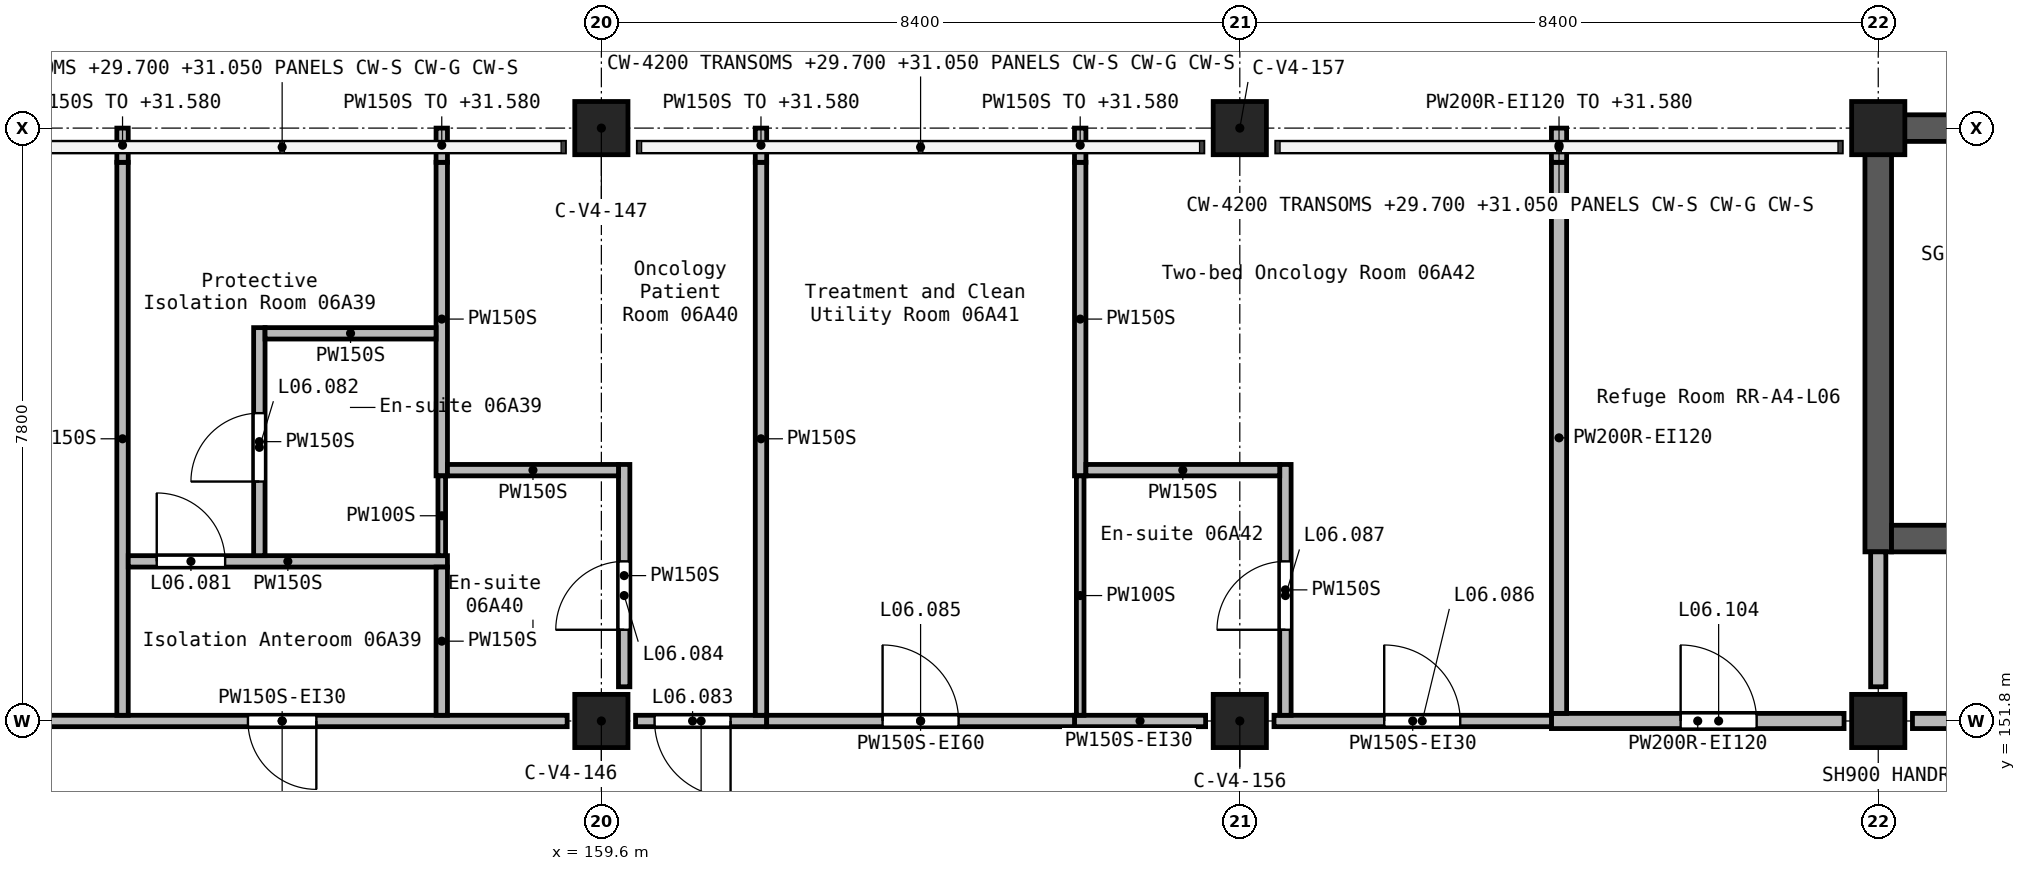
"""IFC4 building model, lengths in metres.
Left out: names, types, materials, properties, quantities, classifications, styles, units other than length and angle.
Written with IfcOpenShell. Run it as: python <this file> out.ifc"""

import sys

from ifc_helpers import new_model, si_unit, direction, frame, frame_2d, origin, origin_2d, place, context, subcontext, project, spatial, rectangle, extrude, element, fill, save


model = new_model("IFC4")
c1 = context("Model", 3, precision=1e-05, world=origin(), true_north=direction((0.0, 1.0)))
c2 = subcontext(c1, "Body", "Model", "MODEL_VIEW")
j1 = project(units=[si_unit("LENGTHUNIT", "METRE"), si_unit("PLANEANGLEUNIT", "RADIAN")], contexts=[c1])
p1 = place(None, origin())
s1 = spatial("IfcSite", under=j1, at=p1, CompositionType="ELEMENT")
p2 = place(p1, origin())
s2 = spatial("IfcBuilding", under=s1, at=p2, CompositionType="ELEMENT")
p3 = place(p2, frame((0.0, 0.0, 28.8)))
s3 = spatial("IfcBuildingStorey", under=s2, at=p3, CompositionType="ELEMENT", Elevation=28.8)
for number, where, z_axis, x_axis in (
    (1, (159.6, 151.8, 0.0), (0.0, 0.0, 1.0), (1.0, 0.0, 0.0)),
    (2, (159.6, 159.6, 0.0), (0.0, 0.0, 1.0), (1.0, 0.0, 0.0)),
    (3, (168.0, 151.8, 0.0), (0.0, 0.0, 1.0), (1.0, 0.0, 0.0)),
    (4, (168.0, 159.6, 0.0), (0.0, 0.0, 1.0), (1.0, 0.0, 0.0)),
    (5, (176.4, 151.8, 0.0), (0.0, 0.0, 1.0), (1.0, 0.0, 0.0)),
    (6, (176.4, 159.6, 0.0), (0.0, 0.0, 1.0), (1.0, 0.0, 0.0)),
):
    element("IfcColumn", number, at=place(p3, frame(where, z_axis=z_axis, x_axis=x_axis)), inside=s3, PredefinedType="COLUMN", context=c2, shape_type="SweptSolid", body=[
        extrude(rectangle(XDim=0.7, YDim=0.7, at=origin_2d()), origin(), (0.0, 0.0, 1.0), 3.9),
    ])
p4 = place(p3, frame((176.225, 159.6, 0.0), z_axis=(0.0, 0.0, 1.0), x_axis=(1.0, 0.0, 0.0)))
e7 = element("IfcWall", 7, at=p4, inside=s3, PredefinedType="SHEAR", context=c2, shape_type="SweptSolid", body=[
    extrude(rectangle(XDim=8.4, YDim=0.35, at=frame_2d((4.2, 0.0))), origin(), (0.0, 0.0, 1.0), 3.9),
])
p5 = place(p3, frame((176.4, 154.025, 0.0), z_axis=(0.0, 0.0, 1.0), x_axis=(0.0, 1.0, 0.0)))
e8 = element("IfcWall", 8, at=p5, inside=s3, PredefinedType="SHEAR", context=c2, shape_type="SweptSolid", body=[
    extrude(rectangle(XDim=5.4, YDim=0.35, at=frame_2d((2.7, 0.0))), origin(), (0.0, 0.0, 1.0), 3.9),
])
p6 = place(p3, frame((176.575, 154.2, 0.0), z_axis=(0.0, 0.0, 1.0), x_axis=(1.0, 0.0, 0.0)))
e9 = element("IfcWall", 9, at=p6, inside=s3, PredefinedType="SHEAR", context=c2, shape_type="SweptSolid", body=[
    extrude(rectangle(XDim=8.05, YDim=0.35, at=frame_2d((4.025, 0.0))), origin(), (0.0, 0.0, 1.0), 3.9),
])
p7 = place(p6, frame((6.525, 0.0, 0.0)))
e10 = element("IfcOpeningElement", 10, at=p7, cuts=e9, PredefinedType="OPENING", context=c2, shape_type="SweptSolid", body=[
    extrude(rectangle(XDim=1.1, YDim=2.1, at=frame_2d((0.55, 1.05))), frame((0.0, 0.185, 0.0), z_axis=(0.0, -1.0, 0.0), x_axis=(1.0, 0.0, 0.0)), (0.0, 0.0, 1.0), 0.37),
])
p8 = place(p3, frame((172.1, 151.8, 0.0), z_axis=(0.0, 0.0, 1.0), x_axis=(1.0, 0.0, 0.0)))
e11 = element("IfcWall", 11, at=p8, inside=s3, PredefinedType="SOLIDWALL", context=c2, shape_type="SweptSolid", body=[
    extrude(rectangle(XDim=3.85, YDim=0.2, at=frame_2d((1.925, 0.0))), origin(), (0.0, 0.0, 1.0), 3.6),
])
p9 = place(p8, frame((1.7, 0.0, 0.0)))
e12 = element("IfcOpeningElement", 12, at=p9, cuts=e11, PredefinedType="OPENING", context=c2, shape_type="SweptSolid", body=[
    extrude(rectangle(XDim=1.0, YDim=2.1, at=frame_2d((0.5, 1.05))), frame((0.0, 0.11, 0.0), z_axis=(0.0, -1.0, 0.0), x_axis=(1.0, 0.0, 0.0)), (0.0, 0.0, 1.0), 0.22),
])
p10 = place(p3, frame((176.85, 151.8, 0.0), z_axis=(0.0, 0.0, 1.0), x_axis=(1.0, 0.0, 0.0)))
e13 = element("IfcWall", 13, at=p10, inside=s3, PredefinedType="SOLIDWALL", context=c2, shape_type="SweptSolid", body=[
    extrude(rectangle(XDim=7.5, YDim=0.2, at=frame_2d((3.75, 0.0))), origin(), (0.0, 0.0, 1.0), 3.6),
])
p11 = place(p10, frame((3.2, 0.0, 0.0)))
e14 = element("IfcOpeningElement", 14, at=p11, cuts=e13, PredefinedType="OPENING", context=c2, shape_type="SweptSolid", body=[
    extrude(rectangle(XDim=1.1, YDim=2.1, at=frame_2d((0.55, 1.05))), frame((0.0, 0.11, 0.0), z_axis=(0.0, -1.0, 0.0), x_axis=(1.0, 0.0, 0.0)), (0.0, 0.0, 1.0), 0.22),
])
p12 = place(p3, frame((176.4, 152.25, 0.0), z_axis=(0.0, 0.0, 1.0), x_axis=(0.0, 1.0, 0.0)))
e15 = element("IfcWall", 15, at=p12, inside=s3, PredefinedType="SOLIDWALL", context=c2, shape_type="SweptSolid", body=[
    extrude(rectangle(XDim=1.775, YDim=0.2, at=frame_2d((0.887, 0.0))), origin(), (0.0, 0.0, 1.0), 3.6),
])
p13 = place(p3, frame((172.2, 151.9, 0.0), z_axis=(0.0, 0.0, 1.0), x_axis=(0.0, 1.0, 0.0)))
e16 = element("IfcWall", 16, at=p13, inside=s3, PredefinedType="SOLIDWALL", context=c2, shape_type="SweptSolid", body=[
    extrude(rectangle(XDim=7.25, YDim=0.2, at=frame_2d((3.625, 0.0))), origin(), (0.0, 0.0, 1.0), 3.6),
])
p14 = place(p3, frame((172.2, 159.15, 0.0), z_axis=(0.0, 0.0, 1.0), x_axis=(0.0, 1.0, 0.0)))
e17 = element("IfcWall", 17, at=p14, inside=s3, PredefinedType="SOLIDWALL", context=c2, shape_type="SweptSolid", body=[
    extrude(rectangle(XDim=0.45, YDim=0.2, at=frame_2d((0.225, 0.0))), origin(), (0.0, 0.0, 1.0), 2.78),
])
p15 = place(p3, frame((161.775, 151.8, 0.0), z_axis=(0.0, 0.0, 1.0), x_axis=(-1.0, 0.0, 0.0)))
e18 = element("IfcWall", 18, at=p15, inside=s3, PredefinedType="PARTITIONING", context=c2, shape_type="SweptSolid", body=[
    extrude(rectangle(XDim=1.725, YDim=0.15, at=frame_2d((0.862, 0.0))), origin(), (0.0, 0.0, 1.0), 3.6),
])
p16 = place(p15, frame((0.475, 0.0, 0.0)))
e19 = element("IfcOpeningElement", 19, at=p16, cuts=e18, PredefinedType="OPENING", context=c2, shape_type="SweptSolid", body=[
    extrude(rectangle(XDim=1.0, YDim=2.1, at=frame_2d((0.5, 1.05))), frame((0.0, 0.085, 0.0), z_axis=(0.0, -1.0, 0.0), x_axis=(1.0, 0.0, 0.0)), (0.0, 0.0, 1.0), 0.17),
])
p17 = place(p3, frame((159.15, 151.8, 0.0), z_axis=(0.0, 0.0, 1.0), x_axis=(-1.0, 0.0, 0.0)))
e20 = element("IfcWall", 20, at=p17, inside=s3, PredefinedType="PARTITIONING", context=c2, shape_type="SweptSolid", body=[
    extrude(rectangle(XDim=7.5, YDim=0.15, at=frame_2d((3.75, 0.0))), origin(), (0.0, 0.0, 1.0), 3.6),
])
p18 = place(p17, frame((3.3, 0.0, 0.0)))
e21 = element("IfcOpeningElement", 21, at=p18, cuts=e20, PredefinedType="OPENING", context=c2, shape_type="SweptSolid", body=[
    extrude(rectangle(XDim=0.9, YDim=2.1, at=frame_2d((0.45, 1.05))), frame((0.0, 0.085, 0.0), z_axis=(0.0, -1.0, 0.0), x_axis=(1.0, 0.0, 0.0)), (0.0, 0.0, 1.0), 0.17),
])
p19 = place(p3, frame((165.825, 151.8, 0.0), z_axis=(0.0, 0.0, 1.0), x_axis=(1.0, 0.0, 0.0)))
e22 = element("IfcWall", 22, at=p19, inside=s3, PredefinedType="PARTITIONING", context=c2, shape_type="SweptSolid", body=[
    extrude(rectangle(XDim=1.725, YDim=0.15, at=frame_2d((0.863, 0.0))), origin(), (0.0, 0.0, 1.0), 3.6),
])
p20 = place(p3, frame((168.45, 151.8, 0.0), z_axis=(0.0, 0.0, 1.0), x_axis=(1.0, 0.0, 0.0)))
e23 = element("IfcWall", 23, at=p20, inside=s3, PredefinedType="PARTITIONING", context=c2, shape_type="SweptSolid", body=[
    extrude(rectangle(XDim=3.65, YDim=0.15, at=frame_2d((1.825, 0.0))), origin(), (0.0, 0.0, 1.0), 3.6),
])
p21 = place(p20, frame((1.45, 0.0, 0.0)))
e24 = element("IfcOpeningElement", 24, at=p21, cuts=e23, PredefinedType="OPENING", context=c2, shape_type="SweptSolid", body=[
    extrude(rectangle(XDim=1.0, YDim=2.1, at=frame_2d((0.5, 1.05))), frame((0.0, 0.085, 0.0), z_axis=(0.0, -1.0, 0.0), x_axis=(1.0, 0.0, 0.0)), (0.0, 0.0, 1.0), 0.17),
])
p22 = place(p3, frame((161.775, 151.8, 0.0), z_axis=(0.0, 0.0, 1.0), x_axis=(1.0, 0.0, 0.0)))
e25 = element("IfcWall", 25, at=p22, inside=s3, PredefinedType="PARTITIONING", context=c2, shape_type="SweptSolid", body=[
    extrude(rectangle(XDim=4.05, YDim=0.15, at=frame_2d((2.025, 0.0))), origin(), (0.0, 0.0, 1.0), 3.6),
])
p23 = place(p22, frame((1.525, 0.0, 0.0)))
e26 = element("IfcOpeningElement", 26, at=p23, cuts=e25, PredefinedType="OPENING", context=c2, shape_type="SweptSolid", body=[
    extrude(rectangle(XDim=1.0, YDim=2.1, at=frame_2d((0.5, 1.05))), frame((0.0, 0.085, 0.0), z_axis=(0.0, -1.0, 0.0), x_axis=(1.0, 0.0, 0.0)), (0.0, 0.0, 1.0), 0.17),
])
p24 = place(p3, frame((153.3, 151.875, 0.0), z_axis=(0.0, 0.0, 1.0), x_axis=(0.0, 1.0, 0.0)))
e27 = element("IfcWall", 27, at=p24, inside=s3, PredefinedType="PARTITIONING", context=c2, shape_type="SweptSolid", body=[
    extrude(rectangle(XDim=7.275, YDim=0.15, at=frame_2d((3.637, 0.0))), origin(), (0.0, 0.0, 1.0), 3.6),
])
p25 = place(p3, frame((153.3, 159.15, 0.0), z_axis=(0.0, 0.0, 1.0), x_axis=(0.0, 1.0, 0.0)))
e28 = element("IfcWall", 28, at=p25, inside=s3, PredefinedType="PARTITIONING", context=c2, shape_type="SweptSolid", body=[
    extrude(rectangle(XDim=0.45, YDim=0.15, at=frame_2d((0.225, 0.0))), origin(), (0.0, 0.0, 1.0), 2.78),
])
p26 = place(p3, frame((161.7, 151.875, 0.0), z_axis=(0.0, 0.0, 1.0), x_axis=(0.0, 1.0, 0.0)))
e29 = element("IfcWall", 29, at=p26, inside=s3, PredefinedType="PARTITIONING", context=c2, shape_type="SweptSolid", body=[
    extrude(rectangle(XDim=7.275, YDim=0.15, at=frame_2d((3.637, 0.0))), origin(), (0.0, 0.0, 1.0), 3.6),
])
p27 = place(p3, frame((161.7, 159.15, 0.0), z_axis=(0.0, 0.0, 1.0), x_axis=(0.0, 1.0, 0.0)))
e30 = element("IfcWall", 30, at=p27, inside=s3, PredefinedType="PARTITIONING", context=c2, shape_type="SweptSolid", body=[
    extrude(rectangle(XDim=0.45, YDim=0.15, at=frame_2d((0.225, 0.0))), origin(), (0.0, 0.0, 1.0), 2.78),
])
p28 = place(p3, frame((157.5, 155.025, 0.0), z_axis=(0.0, 0.0, 1.0), x_axis=(0.0, 1.0, 0.0)))
e31 = element("IfcWall", 31, at=p28, inside=s3, PredefinedType="PARTITIONING", context=c2, shape_type="SweptSolid", body=[
    extrude(rectangle(XDim=4.125, YDim=0.15, at=frame_2d((2.062, 0.0))), origin(), (0.0, 0.0, 1.0), 3.6),
])
p29 = place(p3, frame((157.5, 159.15, 0.0), z_axis=(0.0, 0.0, 1.0), x_axis=(0.0, 1.0, 0.0)))
e32 = element("IfcWall", 32, at=p29, inside=s3, PredefinedType="PARTITIONING", context=c2, shape_type="SweptSolid", body=[
    extrude(rectangle(XDim=0.45, YDim=0.15, at=frame_2d((0.225, 0.0))), origin(), (0.0, 0.0, 1.0), 2.78),
])
p30 = place(p3, frame((165.9, 155.025, 0.0), z_axis=(0.0, 0.0, 1.0), x_axis=(0.0, 1.0, 0.0)))
e33 = element("IfcWall", 33, at=p30, inside=s3, PredefinedType="PARTITIONING", context=c2, shape_type="SweptSolid", body=[
    extrude(rectangle(XDim=4.125, YDim=0.15, at=frame_2d((2.062, 0.0))), origin(), (0.0, 0.0, 1.0), 3.6),
])
p31 = place(p3, frame((165.9, 159.15, 0.0), z_axis=(0.0, 0.0, 1.0), x_axis=(0.0, 1.0, 0.0)))
e34 = element("IfcWall", 34, at=p31, inside=s3, PredefinedType="PARTITIONING", context=c2, shape_type="SweptSolid", body=[
    extrude(rectangle(XDim=0.45, YDim=0.15, at=frame_2d((0.225, 0.0))), origin(), (0.0, 0.0, 1.0), 2.78),
])
p32 = place(p3, frame((153.375, 153.9, 0.0), z_axis=(0.0, 0.0, 1.0), x_axis=(1.0, 0.0, 0.0)))
e35 = element("IfcWall", 35, at=p32, inside=s3, PredefinedType="PARTITIONING", context=c2, shape_type="SweptSolid", body=[
    extrude(rectangle(XDim=4.2, YDim=0.15, at=frame_2d((2.1, 0.0))), origin(), (0.0, 0.0, 1.0), 3.6),
])
p33 = place(p32, frame((0.375, 0.0, 0.0)))
e36 = element("IfcOpeningElement", 36, at=p33, cuts=e35, PredefinedType="OPENING", context=c2, shape_type="SweptSolid", body=[
    extrude(rectangle(XDim=0.9, YDim=2.1, at=frame_2d((0.45, 1.05))), frame((0.0, 0.085, 0.0), z_axis=(0.0, -1.0, 0.0), x_axis=(1.0, 0.0, 0.0)), (0.0, 0.0, 1.0), 0.17),
])
p34 = place(p3, frame((159.9, 152.25, 0.0), z_axis=(0.0, 0.0, 1.0), x_axis=(0.0, 1.0, 0.0)))
e37 = element("IfcWall", 37, at=p34, inside=s3, PredefinedType="PARTITIONING", context=c2, shape_type="SweptSolid", body=[
    extrude(rectangle(XDim=2.925, YDim=0.15, at=frame_2d((1.462, 0.0))), origin(), (0.0, 0.0, 1.0), 3.6),
])
p35 = place(p34, frame((0.75, 0.0, 0.0)))
e38 = element("IfcOpeningElement", 38, at=p35, cuts=e37, PredefinedType="OPENING", context=c2, shape_type="SweptSolid", body=[
    extrude(rectangle(XDim=0.9, YDim=2.1, at=frame_2d((0.45, 1.05))), frame((0.0, 0.085, 0.0), z_axis=(0.0, -1.0, 0.0), x_axis=(1.0, 0.0, 0.0)), (0.0, 0.0, 1.0), 0.17),
])
p36 = place(p3, frame((168.6, 151.875, 0.0), z_axis=(0.0, 0.0, 1.0), x_axis=(0.0, 1.0, 0.0)))
e39 = element("IfcWall", 39, at=p36, inside=s3, PredefinedType="PARTITIONING", context=c2, shape_type="SweptSolid", body=[
    extrude(rectangle(XDim=3.3, YDim=0.15, at=frame_2d((1.65, 0.0))), origin(), (0.0, 0.0, 1.0), 3.6),
])
p37 = place(p36, frame((1.125, 0.0, 0.0)))
e40 = element("IfcOpeningElement", 40, at=p37, cuts=e39, PredefinedType="OPENING", context=c2, shape_type="SweptSolid", body=[
    extrude(rectangle(XDim=0.9, YDim=2.1, at=frame_2d((0.45, 1.05))), frame((0.0, 0.085, 0.0), z_axis=(0.0, -1.0, 0.0), x_axis=(1.0, 0.0, 0.0)), (0.0, 0.0, 1.0), 0.17),
])
p38 = place(p3, frame((155.1, 153.975, 0.0), z_axis=(0.0, 0.0, 1.0), x_axis=(0.0, 1.0, 0.0)))
e41 = element("IfcWall", 41, at=p38, inside=s3, PredefinedType="PARTITIONING", context=c2, shape_type="SweptSolid", body=[
    extrude(rectangle(XDim=3.0, YDim=0.15, at=frame_2d((1.5, 0.0))), origin(), (0.0, 0.0, 1.0), 3.6),
])
p39 = place(p38, frame((0.975, 0.0, 0.0)))
e42 = element("IfcOpeningElement", 42, at=p39, cuts=e41, PredefinedType="OPENING", context=c2, shape_type="SweptSolid", body=[
    extrude(rectangle(XDim=0.9, YDim=2.1, at=frame_2d((0.45, 1.05))), frame((0.0, 0.085, 0.0), z_axis=(0.0, -1.0, 0.0), x_axis=(1.0, 0.0, 0.0)), (0.0, 0.0, 1.0), 0.17),
])
p40 = place(p3, frame((165.975, 155.1, 0.0), z_axis=(0.0, 0.0, 1.0), x_axis=(1.0, 0.0, 0.0)))
e43 = element("IfcWall", 43, at=p40, inside=s3, PredefinedType="PARTITIONING", context=c2, shape_type="SweptSolid", body=[
    extrude(rectangle(XDim=2.55, YDim=0.15, at=frame_2d((1.275, 0.0))), origin(), (0.0, 0.0, 1.0), 3.6),
])
for number, where, z_axis, x_axis in (
    (44, (155.175, 156.9, 0.0), (0.0, 0.0, 1.0), (1.0, 0.0, 0.0)),
    (45, (157.575, 155.1, 0.0), (0.0, 0.0, 1.0), (1.0, 0.0, 0.0)),
):
    element("IfcWall", number, at=place(p3, frame(where, z_axis=z_axis, x_axis=x_axis)), inside=s3, PredefinedType="PARTITIONING", context=c2, shape_type="SweptSolid", body=[
        extrude(rectangle(XDim=2.25, YDim=0.15, at=frame_2d((1.125, 0.0))), origin(), (0.0, 0.0, 1.0), 3.6),
    ])
p41 = place(p3, frame((157.5, 151.875, 0.0), z_axis=(0.0, 0.0, 1.0), x_axis=(0.0, 1.0, 0.0)))
e46 = element("IfcWall", 46, at=p41, inside=s3, PredefinedType="PARTITIONING", context=c2, shape_type="SweptSolid", body=[
    extrude(rectangle(XDim=1.95, YDim=0.15, at=frame_2d((0.975, 0.0))), origin(), (0.0, 0.0, 1.0), 3.6),
])
p42 = place(p3, frame((165.9, 151.875, 0.0), z_axis=(0.0, 0.0, 1.0), x_axis=(0.0, 1.0, 0.0)))
e47 = element("IfcWall", 47, at=p42, inside=s3, PredefinedType="PARTITIONING", context=c2, shape_type="SweptSolid", body=[
    extrude(rectangle(XDim=3.15, YDim=0.1, at=frame_2d((1.575, 0.0))), origin(), (0.0, 0.0, 1.0), 3.6),
])
p43 = place(p3, frame((157.5, 153.975, 0.0), z_axis=(0.0, 0.0, 1.0), x_axis=(0.0, 1.0, 0.0)))
e48 = element("IfcWall", 48, at=p43, inside=s3, PredefinedType="PARTITIONING", context=c2, shape_type="SweptSolid", body=[
    extrude(rectangle(XDim=1.05, YDim=0.1, at=frame_2d((0.525, 0.0))), origin(), (0.0, 0.0, 1.0), 3.6),
])
p44 = place(p18, frame((0.9, 0.0, 0.0), z_axis=(0.0, 0.0, 1.0), x_axis=(-1.0, 0.0, 0.0)))
e49 = element("IfcDoor", 49, at=p44, inside=s3, OperationType="SINGLE_SWING_RIGHT", PredefinedType="DOOR", context=c2, shape_type="SweptSolid", body=[
    extrude(rectangle(XDim=0.9, YDim=2.1, at=frame_2d((0.45, 1.05))), frame((0.0, 0.025, 0.0), z_axis=(0.0, -1.0, 0.0), x_axis=(1.0, 0.0, 0.0)), (0.0, 0.0, 1.0), 0.05),
])
fill(e21, e49)
p45 = place(p33, origin())
e50 = element("IfcDoor", 50, at=p45, inside=s3, OperationType="SINGLE_SWING_LEFT", PredefinedType="DOOR", context=c2, shape_type="SweptSolid", body=[
    extrude(rectangle(XDim=0.9, YDim=2.1, at=frame_2d((0.45, 1.05))), frame((0.0, 0.025, 0.0), z_axis=(0.0, -1.0, 0.0), x_axis=(1.0, 0.0, 0.0)), (0.0, 0.0, 1.0), 0.05),
])
fill(e36, e50)
p46 = place(p39, frame((0.9, 0.0, 0.0), z_axis=(0.0, 0.0, 1.0), x_axis=(-1.0, 0.0, 0.0)))
e51 = element("IfcDoor", 51, at=p46, inside=s3, OperationType="SINGLE_SWING_RIGHT", PredefinedType="DOOR", context=c2, shape_type="SweptSolid", body=[
    extrude(rectangle(XDim=0.9, YDim=2.1, at=frame_2d((0.45, 1.05))), frame((0.0, 0.025, 0.0), z_axis=(0.0, -1.0, 0.0), x_axis=(1.0, 0.0, 0.0)), (0.0, 0.0, 1.0), 0.05),
])
fill(e42, e51)
p47 = place(p16, frame((1.0, 0.0, 0.0), z_axis=(0.0, 0.0, 1.0), x_axis=(-1.0, 0.0, 0.0)))
e52 = element("IfcDoor", 52, at=p47, inside=s3, OperationType="SINGLE_SWING_LEFT", PredefinedType="DOOR", context=c2, shape_type="SweptSolid", body=[
    extrude(rectangle(XDim=1.0, YDim=2.1, at=frame_2d((0.5, 1.05))), frame((0.0, 0.025, 0.0), z_axis=(0.0, -1.0, 0.0), x_axis=(1.0, 0.0, 0.0)), (0.0, 0.0, 1.0), 0.05),
])
fill(e19, e52)
p48 = place(p35, origin())
e53 = element("IfcDoor", 53, at=p48, inside=s3, OperationType="SINGLE_SWING_LEFT", PredefinedType="DOOR", context=c2, shape_type="SweptSolid", body=[
    extrude(rectangle(XDim=0.9, YDim=2.1, at=frame_2d((0.45, 1.05))), frame((0.0, 0.025, 0.0), z_axis=(0.0, -1.0, 0.0), x_axis=(1.0, 0.0, 0.0)), (0.0, 0.0, 1.0), 0.05),
])
fill(e38, e53)
p49 = place(p23, origin())
e54 = element("IfcDoor", 54, at=p49, inside=s3, OperationType="SINGLE_SWING_LEFT", PredefinedType="DOOR", context=c2, shape_type="SweptSolid", body=[
    extrude(rectangle(XDim=1.0, YDim=2.1, at=frame_2d((0.5, 1.05))), frame((0.0, 0.025, 0.0), z_axis=(0.0, -1.0, 0.0), x_axis=(1.0, 0.0, 0.0)), (0.0, 0.0, 1.0), 0.05),
])
fill(e26, e54)
p50 = place(p21, origin())
e55 = element("IfcDoor", 55, at=p50, inside=s3, OperationType="SINGLE_SWING_RIGHT", PredefinedType="DOOR", context=c2, shape_type="SweptSolid", body=[
    extrude(rectangle(XDim=1.0, YDim=2.1, at=frame_2d((0.5, 1.05))), frame((0.0, 0.025, 0.0), z_axis=(0.0, -1.0, 0.0), x_axis=(1.0, 0.0, 0.0)), (0.0, 0.0, 1.0), 0.05),
])
fill(e24, e55)
p51 = place(p37, origin())
e56 = element("IfcDoor", 56, at=p51, inside=s3, OperationType="SINGLE_SWING_LEFT", PredefinedType="DOOR", context=c2, shape_type="SweptSolid", body=[
    extrude(rectangle(XDim=0.9, YDim=2.1, at=frame_2d((0.45, 1.05))), frame((0.0, 0.025, 0.0), z_axis=(0.0, -1.0, 0.0), x_axis=(1.0, 0.0, 0.0)), (0.0, 0.0, 1.0), 0.05),
])
fill(e40, e56)
p52 = place(p9, origin())
e57 = element("IfcDoor", 57, at=p52, inside=s3, OperationType="SINGLE_SWING_RIGHT", PredefinedType="DOOR", context=c2, shape_type="SweptSolid", body=[
    extrude(rectangle(XDim=1.0, YDim=2.1, at=frame_2d((0.5, 1.05))), frame((0.0, 0.025, 0.0), z_axis=(0.0, -1.0, 0.0), x_axis=(1.0, 0.0, 0.0)), (0.0, 0.0, 1.0), 0.05),
])
fill(e12, e57)
save(model, sys.argv[1])
